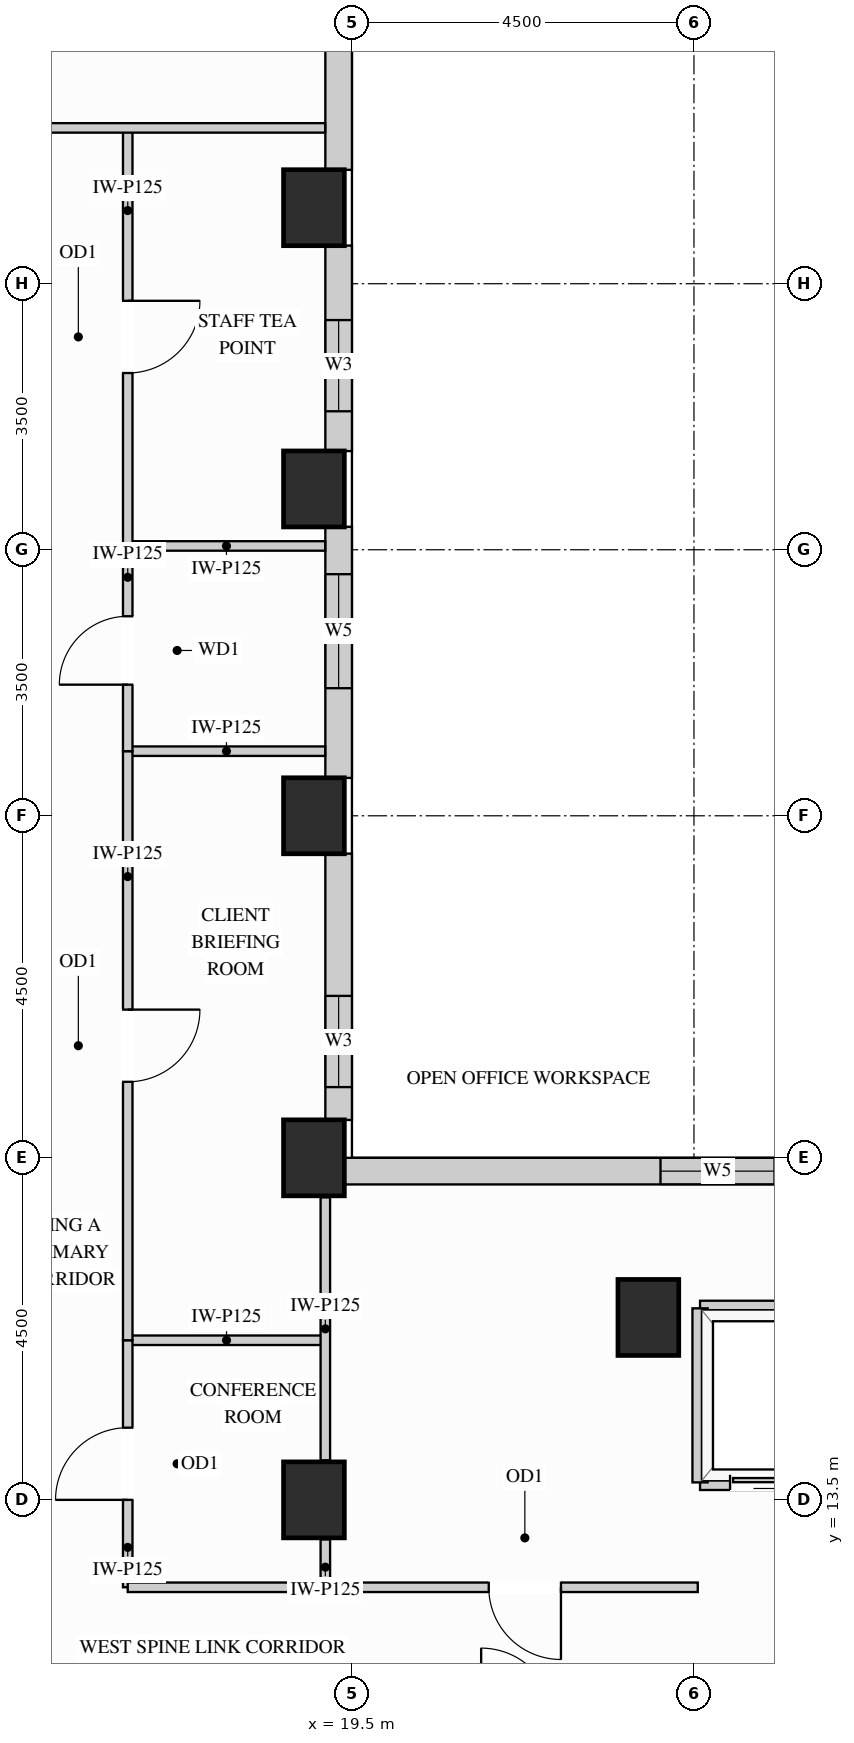
"""IFC4 building model, lengths in metres.
Left out: names, types, materials, properties, quantities, classifications, styles, units other than length and angle.
Written with IfcOpenShell. Run it as: python <this file> out.ifc"""

import sys

from ifc_helpers import new_model, si_unit, direction, frame, frame_2d, origin, origin_2d, place, context, subcontext, project, spatial, rectangle, extrude, source, transform, mapped, element, fill, save


model = new_model("IFC4")
c1 = context("Model", 3, precision=1e-05, world=origin(), true_north=direction((0.0, 1.0)))
c2 = subcontext(c1, "Body", "Model", "MODEL_VIEW")
j1 = project(units=[si_unit("LENGTHUNIT", "METRE"), si_unit("PLANEANGLEUNIT", "RADIAN")], contexts=[c1])
p1 = place(None, origin())
s1 = spatial("IfcSite", under=j1, at=p1, CompositionType="ELEMENT")
p2 = place(p1, origin())
s2 = spatial("IfcBuilding", under=s1, at=p2, CompositionType="ELEMENT")
p3 = place(p2, frame((0.0, 0.0, 204.3)))
s3 = spatial("IfcBuildingStorey", under=s2, at=p3, CompositionType="ELEMENT", Elevation=204.3)
m1 = source(origin(), c2, "Body", "SweptSolid", [
    extrude(rectangle(XDim=0.8, YDim=1.0, at=origin_2d()), origin(), (0.0, 0.0, 1.0), 3.32),
])
for number, where, z_axis, x_axis in (
    (1, (19.0, 13.5, 0.0), (0.0, 0.0, 1.0), (1.0, 0.0, 0.0)),
    (2, (19.0, 18.0, 0.0), (0.0, 0.0, 1.0), (1.0, 0.0, 0.0)),
    (3, (19.0, 22.5, 0.0), (0.0, 0.0, 1.0), (1.0, 0.0, 0.0)),
    (4, (19.0, 26.8, 0.0), (0.0, 0.0, 1.0), (1.0, 0.0, 0.0)),
    (5, (19.0, 30.5, 0.0), (0.0, 0.0, 1.0), (1.0, 0.0, 0.0)),
    (6, (23.4, 15.9, 0.0), (0.0, 0.0, 1.0), (1.0, 0.0, 0.0)),
):
    element("IfcColumn", number, at=place(p3, frame(where, z_axis=z_axis, x_axis=x_axis)), inside=s3, PredefinedType="COLUMN", context=c2, shape_type="MappedRepresentation", body=[
        mapped(m1, transform((0.0, 0.0, 0.0), x_axis=(1.0, 0.0, 0.0), y_axis=(0.0, 1.0, 0.0), z_axis=(0.0, 0.0, 1.0))),
    ])
p4 = place(p3, frame((34.502, 17.825, 0.0), z_axis=(0.0, 0.0, 1.0), x_axis=(-1.0, 0.0, 0.0)))
e7 = element("IfcWall", 7, at=p4, inside=s3, PredefinedType="SOLIDWALL", context=c2, shape_type="SweptSolid", body=[
    extrude(rectangle(XDim=15.104, YDim=0.35, at=frame_2d((7.552, 0.0))), origin(), (0.0, 0.0, 1.0), 3.305),
])
p5 = place(p4, frame((4.131, 0.0, 0.78)))
e8 = element("IfcOpeningElement", 8, at=p5, cuts=e7, PredefinedType="OPENING", context=c2, shape_type="SweptSolid", body=[
    extrude(rectangle(XDim=1.5, YDim=2.0, at=frame_2d((0.75, 1.0))), frame((0.0, 0.185, 0.0), z_axis=(0.0, -1.0, 0.0), x_axis=(1.0, 0.0, 0.0)), (0.0, 0.0, 1.0), 0.37),
])
p6 = place(p4, frame((9.442, 0.0, 0.78)))
e9 = element("IfcOpeningElement", 9, at=p6, cuts=e7, PredefinedType="OPENING", context=c2, shape_type="SweptSolid", body=[
    extrude(rectangle(XDim=1.5, YDim=2.0, at=frame_2d((0.75, 1.0))), frame((0.0, 0.185, 0.0), z_axis=(0.0, -1.0, 0.0), x_axis=(1.0, 0.0, 0.0)), (0.0, 0.0, 1.0), 0.37),
])
p7 = place(p3, frame((19.325, 18.498, 0.0), z_axis=(0.0, 0.0, 1.0), x_axis=(0.0, 1.0, 0.0)))
e10 = element("IfcWall", 10, at=p7, inside=s3, PredefinedType="SOLIDWALL", context=c2, shape_type="SweptSolid", body=[
    extrude(rectangle(XDim=3.504, YDim=0.35, at=frame_2d((1.752, 0.0))), origin(), (0.0, 0.0, 1.0), 2.532),
])
p8 = place(p7, frame((0.433, 0.0, 0.78)))
e11 = element("IfcOpeningElement", 11, at=p8, cuts=e10, PredefinedType="OPENING", context=c2, shape_type="SweptSolid", body=[
    extrude(rectangle(XDim=1.2, YDim=1.572, at=frame_2d((0.6, 0.786))), frame((0.0, 0.185, 0.0), z_axis=(0.0, -1.0, 0.0), x_axis=(1.0, 0.0, 0.0)), (0.0, 0.0, 1.0), 0.37),
])
p9 = place(p3, frame((19.325, 22.998, 0.0), z_axis=(0.0, 0.0, 1.0), x_axis=(0.0, 1.0, 0.0)))
e12 = element("IfcWall", 12, at=p9, inside=s3, PredefinedType="SOLIDWALL", context=c2, shape_type="SweptSolid", body=[
    extrude(rectangle(XDim=3.304, YDim=0.35, at=frame_2d((1.652, 0.0))), origin(), (0.0, 0.0, 1.0), 2.532),
])
p10 = place(p9, frame((1.18, 0.0, 0.78)))
e13 = element("IfcOpeningElement", 13, at=p10, cuts=e12, PredefinedType="OPENING", context=c2, shape_type="SweptSolid", body=[
    extrude(rectangle(XDim=1.5, YDim=1.572, at=frame_2d((0.75, 0.786))), frame((0.0, 0.185, 0.0), z_axis=(0.0, -1.0, 0.0), x_axis=(1.0, 0.0, 0.0)), (0.0, 0.0, 1.0), 0.37),
])
p11 = place(p3, frame((19.325, 27.298, 0.0), z_axis=(0.0, 0.0, 1.0), x_axis=(0.0, 1.0, 0.0)))
e14 = element("IfcWall", 14, at=p11, inside=s3, PredefinedType="SOLIDWALL", context=c2, shape_type="SweptSolid", body=[
    extrude(rectangle(XDim=2.704, YDim=0.35, at=frame_2d((1.352, 0.0))), origin(), (0.0, 0.0, 1.0), 2.532),
])
p12 = place(p11, frame((0.524, 0.0, 0.78)))
e15 = element("IfcOpeningElement", 15, at=p12, cuts=e14, PredefinedType="OPENING", context=c2, shape_type="SweptSolid", body=[
    extrude(rectangle(XDim=1.2, YDim=1.572, at=frame_2d((0.6, 0.786))), frame((0.0, 0.185, 0.0), z_axis=(0.0, -1.0, 0.0), x_axis=(1.0, 0.0, 0.0)), (0.0, 0.0, 1.0), 0.37),
])
m2 = source(origin(), c2, "Body", "SweptSolid", [
    extrude(rectangle(XDim=3.504, YDim=0.35, at=frame_2d((1.752, 0.0))), origin(), (0.0, 0.0, 1.0), 2.532),
])
p13 = place(p3, frame((19.325, 30.998, 0.0), z_axis=(0.0, 0.0, 1.0), x_axis=(0.0, 1.0, 0.0)))
e16 = element("IfcWall", 16, at=p13, inside=s3, PredefinedType="SOLIDWALL", context=c2, shape_type="MappedRepresentation", body=[
    mapped(m2, transform((0.0, 0.0, 0.0), x_axis=(1.0, 0.0, 0.0), y_axis=(0.0, 1.0, 0.0), z_axis=(0.0, 0.0, 1.0))),
])
m3 = source(origin(), c2, "Body", "SweptSolid", [
    extrude(rectangle(XDim=2.6, YDim=0.125, at=frame_2d((1.3, 0.0))), origin(), (0.0, 0.0, 1.0), 3.305),
])
p14 = place(p3, frame((16.55, 15.6, 0.0), z_axis=(0.0, 0.0, 1.0), x_axis=(1.0, 0.0, 0.0)))
e17 = element("IfcWall", 17, at=p14, inside=s3, PredefinedType="PARTITIONING", context=c2, shape_type="MappedRepresentation", body=[
    mapped(m3, transform((0.0, 0.0, 0.0), x_axis=(1.0, 0.0, 0.0), y_axis=(0.0, 1.0, 0.0), z_axis=(0.0, 0.0, 1.0))),
])
m4 = source(origin(), c2, "Body", "SweptSolid", [
    extrude(rectangle(XDim=2.598, YDim=0.125, at=frame_2d((1.299, 0.0))), origin(), (0.0, 0.0, 1.0), 3.305),
])
for number, where, z_axis, x_axis in (
    (18, (16.55, 23.35, 0.0), (0.0, 0.0, 1.0), (1.0, 0.0, 0.0)),
    (19, (16.55, 26.05, 0.0), (0.0, 0.0, 1.0), (1.0, 0.0, 0.0)),
):
    element("IfcWall", number, at=place(p3, frame(where, z_axis=z_axis, x_axis=x_axis)), inside=s3, PredefinedType="PARTITIONING", context=c2, shape_type="MappedRepresentation", body=[
        mapped(m4, transform((0.0, 0.0, 0.0), x_axis=(1.0, 0.0, 0.0), y_axis=(0.0, 1.0, 0.0), z_axis=(0.0, 0.0, 1.0))),
    ])
m5 = source(origin(), c2, "Body", "SweptSolid", [
    extrude(rectangle(XDim=0.63, YDim=0.125, at=frame_2d((0.315, 0.0))), origin(), (0.0, 0.0, 1.0), 2.693),
])
p15 = place(p3, frame((19.15, 12.35, 0.0), z_axis=(0.0, 0.0, 1.0), x_axis=(0.0, 1.0, 0.0)))
e20 = element("IfcWall", 20, at=p15, inside=s3, PredefinedType="PARTITIONING", context=c2, shape_type="MappedRepresentation", body=[
    mapped(m5, transform((0.0, 0.0, 0.0), x_axis=(1.0, 0.0, 0.0), y_axis=(0.0, 1.0, 0.0), z_axis=(0.0, 0.0, 1.0))),
])
m6 = source(origin(), c2, "Body", "SweptSolid", [
    extrude(rectangle(XDim=3.46, YDim=0.125, at=frame_2d((1.73, 0.0))), origin(), (0.0, 0.0, 1.0), 2.693),
])
p16 = place(p3, frame((19.15, 14.02, 0.0), z_axis=(0.0, 0.0, 1.0), x_axis=(0.0, 1.0, 0.0)))
e21 = element("IfcWall", 21, at=p16, inside=s3, PredefinedType="PARTITIONING", context=c2, shape_type="MappedRepresentation", body=[
    mapped(m6, transform((0.0, 0.0, 0.0), x_axis=(1.0, 0.0, 0.0), y_axis=(0.0, 1.0, 0.0), z_axis=(0.0, 0.0, 1.0))),
])
p17 = place(p3, frame((16.55, 12.35, 0.0), z_axis=(0.0, 0.0, 1.0), x_axis=(0.0, 1.0, 0.0)))
e22 = element("IfcWall", 22, at=p17, inside=s3, PredefinedType="PARTITIONING", context=c2, shape_type="SweptSolid", body=[
    extrude(rectangle(XDim=3.25, YDim=0.125, at=frame_2d((1.625, 0.0))), origin(), (0.0, 0.0, 1.0), 3.305),
])
p18 = place(p17, frame((1.15, 0.0, 0.0)))
e23 = element("IfcOpeningElement", 23, at=p18, cuts=e22, PredefinedType="OPENING", context=c2, shape_type="SweptSolid", body=[
    extrude(rectangle(XDim=0.95, YDim=2.15, at=frame_2d((0.475, 1.075))), frame((0.0, 0.073, 0.0), z_axis=(0.0, -1.0, 0.0), x_axis=(1.0, 0.0, 0.0)), (0.0, 0.0, 1.0), 0.145),
])
p19 = place(p3, frame((16.55, 15.6, 0.0), z_axis=(0.0, 0.0, 1.0), x_axis=(0.0, 1.0, 0.0)))
e24 = element("IfcWall", 24, at=p19, inside=s3, PredefinedType="PARTITIONING", context=c2, shape_type="SweptSolid", body=[
    extrude(rectangle(XDim=7.75, YDim=0.125, at=frame_2d((3.875, 0.0))), origin(), (0.0, 0.0, 1.0), 3.305),
])
p20 = place(p19, frame((3.4, 0.0, 0.0)))
e25 = element("IfcOpeningElement", 25, at=p20, cuts=e24, PredefinedType="OPENING", context=c2, shape_type="SweptSolid", body=[
    extrude(rectangle(XDim=0.95, YDim=2.15, at=frame_2d((0.475, 1.075))), frame((0.0, 0.073, 0.0), z_axis=(0.0, -1.0, 0.0), x_axis=(1.0, 0.0, 0.0)), (0.0, 0.0, 1.0), 0.145),
])
p21 = place(p3, frame((16.55, 26.05, 0.0), z_axis=(0.0, 0.0, 1.0), x_axis=(0.0, 1.0, 0.0)))
e26 = element("IfcWall", 26, at=p21, inside=s3, PredefinedType="PARTITIONING", context=c2, shape_type="SweptSolid", body=[
    extrude(rectangle(XDim=5.5, YDim=0.125, at=frame_2d((2.75, 0.0))), origin(), (0.0, 0.0, 1.0), 3.305),
])
p22 = place(p21, frame((2.275, 0.0, 0.0)))
e27 = element("IfcOpeningElement", 27, at=p22, cuts=e26, PredefinedType="OPENING", context=c2, shape_type="SweptSolid", body=[
    extrude(rectangle(XDim=0.95, YDim=2.15, at=frame_2d((0.475, 1.075))), frame((0.0, 0.073, 0.0), z_axis=(0.0, -1.0, 0.0), x_axis=(1.0, 0.0, 0.0)), (0.0, 0.0, 1.0), 0.145),
])
p23 = place(p3, frame((16.55, 23.35, 0.0), z_axis=(0.0, 0.0, 1.0), x_axis=(0.0, 1.0, 0.0)))
e28 = element("IfcWall", 28, at=p23, inside=s3, PredefinedType="PARTITIONING", context=c2, shape_type="SweptSolid", body=[
    extrude(rectangle(XDim=2.7, YDim=0.125, at=frame_2d((1.35, 0.0))), origin(), (0.0, 0.0, 1.0), 3.305),
])
p24 = place(p23, frame((0.875, 0.0, 0.0)))
e29 = element("IfcOpeningElement", 29, at=p24, cuts=e28, PredefinedType="OPENING", context=c2, shape_type="SweptSolid", body=[
    extrude(rectangle(XDim=0.9, YDim=2.15, at=frame_2d((0.45, 1.075))), frame((0.0, 0.073, 0.0), z_axis=(0.0, -1.0, 0.0), x_axis=(1.0, 0.0, 0.0)), (0.0, 0.0, 1.0), 0.145),
])
m7 = source(origin(), c2, "Body", "SweptSolid", [
    extrude(rectangle(XDim=12.598, YDim=0.125, at=frame_2d((6.299, 0.0))), origin(), (0.0, 0.0, 1.0), 3.305),
])
p25 = place(p3, frame((6.55, 31.55, 0.0), z_axis=(0.0, 0.0, 1.0), x_axis=(1.0, 0.0, 0.0)))
e30 = element("IfcWall", 30, at=p25, inside=s3, PredefinedType="PARTITIONING", context=c2, shape_type="MappedRepresentation", body=[
    mapped(m7, transform((0.0, 0.0, 0.0), x_axis=(1.0, 0.0, 0.0), y_axis=(0.0, 1.0, 0.0), z_axis=(0.0, 0.0, 1.0))),
])
m8 = source(origin(), c2, "Body", "SweptSolid", [
    extrude(rectangle(XDim=2.95, YDim=0.125, at=frame_2d((1.475, 0.0))), origin(), (0.0, 0.0, 1.0), 3.305),
])
p26 = place(p3, frame((16.55, 12.35, 0.0), z_axis=(0.0, 0.0, 1.0), x_axis=(1.0, 0.0, 0.0)))
e31 = element("IfcWall", 31, at=p26, inside=s3, PredefinedType="PARTITIONING", context=c2, shape_type="MappedRepresentation", body=[
    mapped(m8, transform((0.0, 0.0, 0.0), x_axis=(1.0, 0.0, 0.0), y_axis=(0.0, 1.0, 0.0), z_axis=(0.0, 0.0, 1.0))),
])
p27 = place(p3, frame((19.5, 12.35, 0.0), z_axis=(0.0, 0.0, 1.0), x_axis=(1.0, 0.0, 0.0)))
e32 = element("IfcWall", 32, at=p27, inside=s3, PredefinedType="PARTITIONING", context=c2, shape_type="SweptSolid", body=[
    extrude(rectangle(XDim=4.55, YDim=0.125, at=frame_2d((2.275, 0.0))), origin(), (0.0, 0.0, 1.0), 3.305),
])
p28 = place(p27, frame((1.8, 0.0, 0.0)))
e33 = element("IfcOpeningElement", 33, at=p28, cuts=e32, PredefinedType="OPENING", context=c2, shape_type="SweptSolid", body=[
    extrude(rectangle(XDim=0.95, YDim=2.15, at=frame_2d((0.475, 1.075))), frame((0.0, 0.073, 0.0), z_axis=(0.0, -1.0, 0.0), x_axis=(1.0, 0.0, 0.0)), (0.0, 0.0, 1.0), 0.145),
])
m9 = source(origin(), c2, "Body", "SweptSolid", [
    extrude(rectangle(XDim=1.89, YDim=0.2, at=frame_2d((0.945, 0.0))), origin(), (0.0, 0.0, 1.0), 2.693),
])
p29 = place(p3, frame((24.08, 16.02, 0.0), z_axis=(0.0, 0.0, 1.0), x_axis=(1.0, 0.0, 0.0)))
e34 = element("IfcWall", 34, at=p29, inside=s3, PredefinedType="PARTITIONING", context=c2, shape_type="MappedRepresentation", body=[
    mapped(m9, transform((0.0, 0.0, 0.0), x_axis=(1.0, 0.0, 0.0), y_axis=(0.0, 1.0, 0.0), z_axis=(0.0, 0.0, 1.0))),
])
p30 = place(p3, frame((24.08, 13.73, 0.0), z_axis=(0.0, 0.0, 1.0), x_axis=(1.0, 0.0, 0.0)))
e35 = element("IfcWall", 35, at=p30, inside=s3, PredefinedType="PARTITIONING", context=c2, shape_type="SweptSolid", body=[
    extrude(rectangle(XDim=1.89, YDim=0.2, at=frame_2d((0.945, 0.0))), origin(), (0.0, 0.0, 1.0), 2.386),
])
p31 = place(p30, frame((0.395, 0.0, 0.0)))
e36 = element("IfcOpeningElement", 36, at=p31, cuts=e35, PredefinedType="OPENING", context=c2, shape_type="SweptSolid", body=[
    extrude(rectangle(XDim=1.1, YDim=2.2, at=frame_2d((0.55, 1.1))), frame((0.0, 0.11, 0.0), z_axis=(0.0, -1.0, 0.0), x_axis=(1.0, 0.0, 0.0)), (0.0, 0.0, 1.0), 0.22),
])
m10 = source(origin(), c2, "Body", "SweptSolid", [
    extrude(rectangle(XDim=2.29, YDim=0.2, at=frame_2d((1.145, 0.0))), origin(), (0.0, 0.0, 1.0), 3.305),
])
p32 = place(p3, frame((24.08, 13.73, 0.0), z_axis=(0.0, 0.0, 1.0), x_axis=(0.0, 1.0, 0.0)))
e37 = element("IfcWall", 37, at=p32, inside=s3, PredefinedType="PARTITIONING", context=c2, shape_type="MappedRepresentation", body=[
    mapped(m10, transform((0.0, 0.0, 0.0), x_axis=(1.0, 0.0, 0.0), y_axis=(0.0, 1.0, 0.0), z_axis=(0.0, 0.0, 1.0))),
])
m11 = source(origin(), c2, "Body", "SweptSolid", [
    extrude(rectangle(XDim=1.1, YDim=2.2, at=frame_2d((0.55, 1.1))), frame((0.0, 0.025, 0.0), z_axis=(0.0, -1.0, 0.0), x_axis=(1.0, 0.0, 0.0)), (0.0, 0.0, 1.0), 0.05),
])
p33 = place(p31, origin())
e38 = element("IfcDoor", 38, at=p33, inside=s3, OperationType="SLIDING_TO_LEFT", PredefinedType="DOOR", context=c2, shape_type="MappedRepresentation", body=[
    mapped(m11, transform((0.0, 0.0, 0.0), x_axis=(1.0, 0.0, 0.0), y_axis=(0.0, 1.0, 0.0), z_axis=(0.0, 0.0, 1.0))),
])
fill(e36, e38)
m12 = source(origin(), c2, "Body", "SweptSolid", [
    extrude(rectangle(XDim=0.95, YDim=2.15, at=frame_2d((0.475, 1.075))), frame((0.0, 0.025, 0.0), z_axis=(0.0, -1.0, 0.0), x_axis=(1.0, 0.0, 0.0)), (0.0, 0.0, 1.0), 0.05),
])
p34 = place(p18, origin())
e39 = element("IfcDoor", 39, at=p34, inside=s3, OperationType="SINGLE_SWING_LEFT", PredefinedType="DOOR", context=c2, shape_type="MappedRepresentation", body=[
    mapped(m12, transform((0.0, 0.0, 0.0), x_axis=(1.0, 0.0, 0.0), y_axis=(0.0, 1.0, 0.0), z_axis=(0.0, 0.0, 1.0))),
])
fill(e23, e39)
p35 = place(p20, origin())
e40 = element("IfcDoor", 40, at=p35, inside=s3, OperationType="SINGLE_SWING_RIGHT", PredefinedType="DOOR", context=c2, shape_type="MappedRepresentation", body=[
    mapped(m12, transform((0.0, 0.0, 0.0), x_axis=(1.0, 0.0, 0.0), y_axis=(0.0, 1.0, 0.0), z_axis=(0.0, 0.0, 1.0))),
])
fill(e25, e40)
p36 = place(p22, origin())
e41 = element("IfcDoor", 41, at=p36, inside=s3, OperationType="SINGLE_SWING_RIGHT", PredefinedType="DOOR", context=c2, shape_type="MappedRepresentation", body=[
    mapped(m12, transform((0.0, 0.0, 0.0), x_axis=(1.0, 0.0, 0.0), y_axis=(0.0, 1.0, 0.0), z_axis=(0.0, 0.0, 1.0))),
])
fill(e27, e41)
p37 = place(p28, origin())
e42 = element("IfcDoor", 42, at=p37, inside=s3, OperationType="SINGLE_SWING_RIGHT", PredefinedType="DOOR", context=c2, shape_type="MappedRepresentation", body=[
    mapped(m12, transform((0.0, 0.0, 0.0), x_axis=(1.0, 0.0, 0.0), y_axis=(0.0, 1.0, 0.0), z_axis=(0.0, 0.0, 1.0))),
])
fill(e33, e42)
m13 = source(origin(), c2, "Body", "SweptSolid", [
    extrude(rectangle(XDim=0.9, YDim=2.15, at=frame_2d((0.45, 1.075))), frame((0.0, 0.025, 0.0), z_axis=(0.0, -1.0, 0.0), x_axis=(1.0, 0.0, 0.0)), (0.0, 0.0, 1.0), 0.05),
])
p38 = place(p24, origin())
e43 = element("IfcDoor", 43, at=p38, inside=s3, OperationType="SINGLE_SWING_LEFT", PredefinedType="DOOR", context=c2, shape_type="MappedRepresentation", body=[
    mapped(m13, transform((0.0, 0.0, 0.0), x_axis=(1.0, 0.0, 0.0), y_axis=(0.0, 1.0, 0.0), z_axis=(0.0, 0.0, 1.0))),
])
fill(e29, e43)
m14 = source(origin(), c2, "Body", "SweptSolid", [
    extrude(rectangle(XDim=1.2, YDim=1.572, at=frame_2d((0.6, 0.786))), frame((0.0, 0.03, 0.0), z_axis=(0.0, -1.0, 0.0), x_axis=(1.0, 0.0, 0.0)), (0.0, 0.0, 1.0), 0.06),
])
p39 = place(p8, origin())
e44 = element("IfcWindow", 44, at=p39, inside=s3, PartitioningType="SINGLE_PANEL", PredefinedType="WINDOW", context=c2, shape_type="MappedRepresentation", body=[
    mapped(m14, transform((0.0, 0.0, 0.0), x_axis=(1.0, 0.0, 0.0), y_axis=(0.0, 1.0, 0.0), z_axis=(0.0, 0.0, 1.0))),
])
fill(e11, e44)
p40 = place(p12, origin())
e45 = element("IfcWindow", 45, at=p40, inside=s3, PartitioningType="SINGLE_PANEL", PredefinedType="WINDOW", context=c2, shape_type="MappedRepresentation", body=[
    mapped(m14, transform((0.0, 0.0, 0.0), x_axis=(1.0, 0.0, 0.0), y_axis=(0.0, 1.0, 0.0), z_axis=(0.0, 0.0, 1.0))),
])
fill(e15, e45)
m15 = source(origin(), c2, "Body", "SweptSolid", [
    extrude(rectangle(XDim=1.5, YDim=2.0, at=frame_2d((0.75, 1.0))), frame((0.0, 0.03, 0.0), z_axis=(0.0, -1.0, 0.0), x_axis=(1.0, 0.0, 0.0)), (0.0, 0.0, 1.0), 0.06),
])
p41 = place(p6, origin())
e46 = element("IfcWindow", 46, at=p41, inside=s3, PartitioningType="SINGLE_PANEL", PredefinedType="WINDOW", context=c2, shape_type="MappedRepresentation", body=[
    mapped(m15, transform((0.0, 0.0, 0.0), x_axis=(1.0, 0.0, 0.0), y_axis=(0.0, 1.0, 0.0), z_axis=(0.0, 0.0, 1.0))),
])
fill(e9, e46)
m16 = source(origin(), c2, "Body", "SweptSolid", [
    extrude(rectangle(XDim=1.5, YDim=1.572, at=frame_2d((0.75, 0.786))), frame((0.0, 0.03, 0.0), z_axis=(0.0, -1.0, 0.0), x_axis=(1.0, 0.0, 0.0)), (0.0, 0.0, 1.0), 0.06),
])
p42 = place(p10, origin())
e47 = element("IfcWindow", 47, at=p42, inside=s3, PartitioningType="SINGLE_PANEL", PredefinedType="WINDOW", context=c2, shape_type="MappedRepresentation", body=[
    mapped(m16, transform((0.0, 0.0, 0.0), x_axis=(1.0, 0.0, 0.0), y_axis=(0.0, 1.0, 0.0), z_axis=(0.0, 0.0, 1.0))),
])
fill(e13, e47)
save(model, sys.argv[1])
